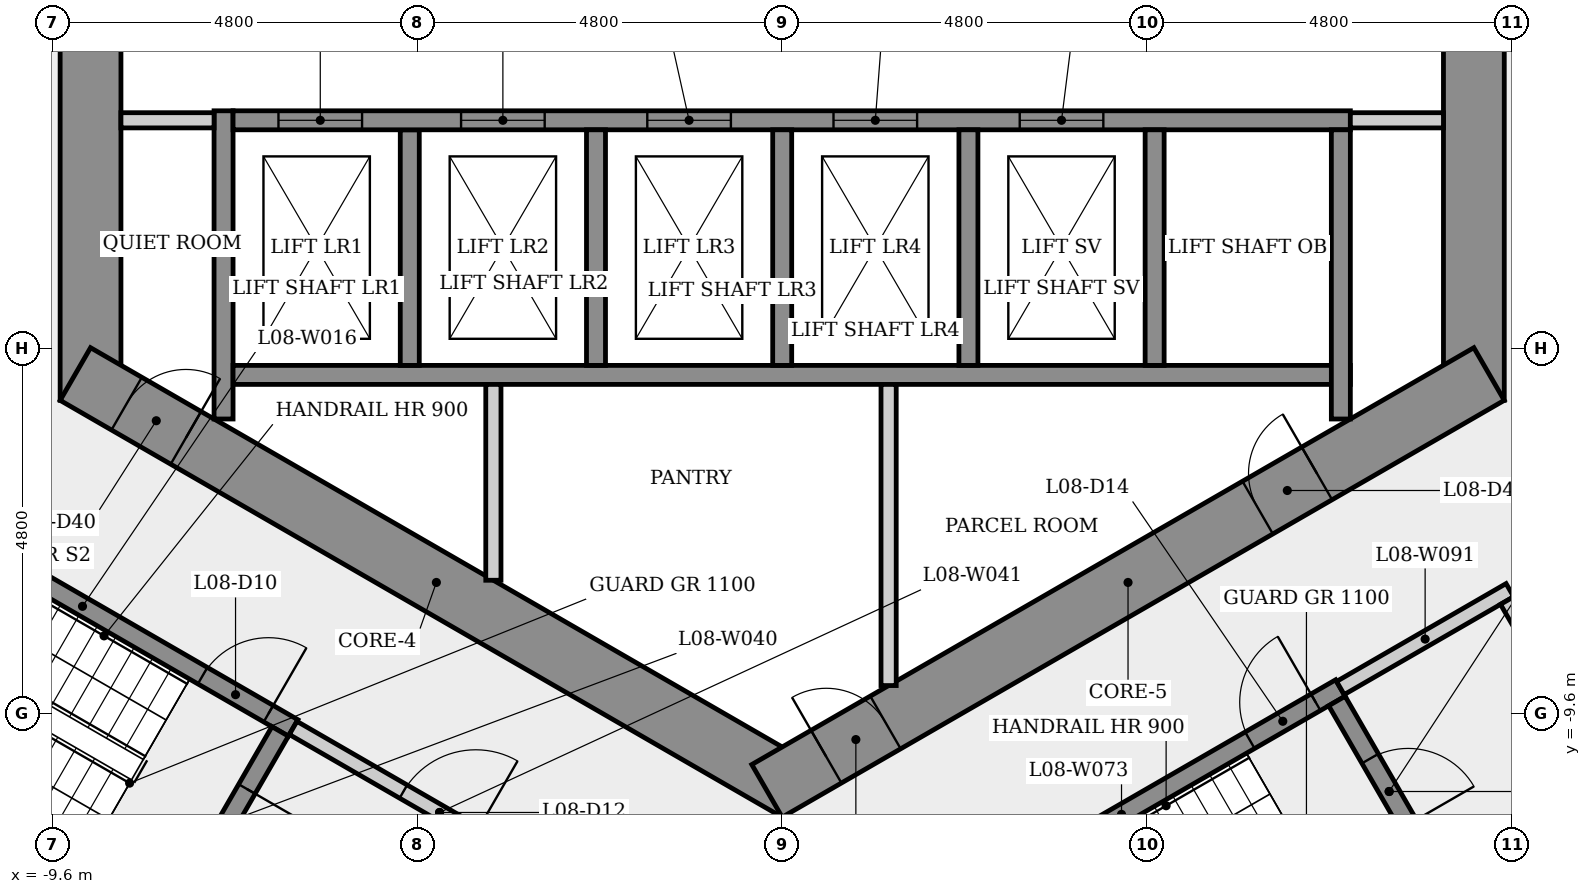
"""IFC4 building model, lengths in metres.
Left out: names, types, materials, properties, quantities, classifications, styles, units other than length and angle.
Written with IfcOpenShell. Run it as: python <this file> out.ifc"""

import sys

from ifc_helpers import new_model, si_unit, direction, frame, frame_2d, origin, place, context, subcontext, project, spatial, rectangle, extrude, element, fill, save


model = new_model("IFC4")
c1 = context("Model", 3, precision=1e-05, world=origin(), true_north=direction((0.0, 1.0)))
c2 = subcontext(c1, "Body", "Model", "MODEL_VIEW")
j1 = project(units=[si_unit("LENGTHUNIT", "METRE"), si_unit("PLANEANGLEUNIT", "RADIAN")], contexts=[c1])
p1 = place(None, origin())
s1 = spatial("IfcSite", under=j1, at=p1, CompositionType="ELEMENT")
p2 = place(p1, origin())
s2 = spatial("IfcBuilding", under=s1, at=p2, CompositionType="ELEMENT")
p3 = place(p2, frame((0.0, 0.0, 35.7)))
s3 = spatial("IfcBuildingStorey", under=s2, at=p3, CompositionType="ELEMENT", Elevation=35.7)
p4 = place(p3, frame((9.1, -5.485, 0.0), z_axis=(0.0, 0.0, 1.0), x_axis=(0.0, 1.0, 0.0)))
e1 = element("IfcWall", 1, at=p4, inside=s3, PredefinedType="SHEAR", context=c2, shape_type="SweptSolid", body=[
    extrude(rectangle(XDim=10.97, YDim=0.8, at=frame_2d((5.485, 0.0))), origin(), (0.0, 0.0, 1.0), 3.4),
])
p5 = place(p4, frame((4.685, 0.0, 0.0)))
e2 = element("IfcOpeningElement", 2, at=p5, cuts=e1, PredefinedType="OPENING", context=c2, shape_type="SweptSolid", body=[
    extrude(rectangle(XDim=1.6, YDim=2.1, at=frame_2d((0.8, 1.05))), frame((0.0, 0.41, 0.0), z_axis=(0.0, -1.0, 0.0), x_axis=(1.0, 0.0, 0.0)), (0.0, 0.0, 1.0), 0.82),
])
p6 = place(p3, frame((-9.1, 5.485, 0.0), z_axis=(0.0, 0.0, 1.0), x_axis=(0.0, -1.0, 0.0)))
e3 = element("IfcWall", 3, at=p6, inside=s3, PredefinedType="SHEAR", context=c2, shape_type="SweptSolid", body=[
    extrude(rectangle(XDim=10.97, YDim=0.8, at=frame_2d((5.485, 0.0))), origin(), (0.0, 0.0, 1.0), 3.4),
])
p7 = place(p6, frame((4.685, 0.0, 0.0)))
e4 = element("IfcOpeningElement", 4, at=p7, cuts=e3, PredefinedType="OPENING", context=c2, shape_type="SweptSolid", body=[
    extrude(rectangle(XDim=1.6, YDim=2.1, at=frame_2d((0.8, 1.05))), frame((0.0, 0.41, 0.0), z_axis=(0.0, -1.0, 0.0), x_axis=(1.0, 0.0, 0.0)), (0.0, 0.0, 1.0), 0.82),
])
p8 = place(p3, frame((-9.3, -5.138, 0.0), z_axis=(0.0, 0.0, 1.0), x_axis=(0.866023993627, -0.500002442456, 0.0)))
e5 = element("IfcWall", 5, at=p8, inside=s3, PredefinedType="SHEAR", context=c2, shape_type="SweptSolid", body=[
    extrude(rectangle(XDim=10.97, YDim=0.8, at=frame_2d((5.485, 0.0))), origin(), (0.0, 0.0, 1.0), 3.4),
])
p9 = place(p8, frame((0.78, 0.0, 0.0)))
e6 = element("IfcOpeningElement", 6, at=p9, cuts=e5, PredefinedType="OPENING", context=c2, shape_type="SweptSolid", body=[
    extrude(rectangle(XDim=0.9, YDim=2.1, at=frame_2d((0.45, 1.05))), frame((0.0, 0.41, 0.0), z_axis=(0.0, -1.0, 0.0), x_axis=(1.0, 0.0, 0.0)), (0.0, 0.0, 1.0), 0.82),
])
p10 = place(p3, frame((-0.2, -10.623, 0.0), z_axis=(0.0, 0.0, 1.0), x_axis=(0.866023993627, 0.500002442456, 0.0)))
e7 = element("IfcWall", 7, at=p10, inside=s3, PredefinedType="SHEAR", context=c2, shape_type="SweptSolid", body=[
    extrude(rectangle(XDim=10.97, YDim=0.8, at=frame_2d((5.485, 0.0))), origin(), (0.0, 0.0, 1.0), 3.4),
])
p11 = place(p10, frame((0.9, 0.0, 0.0)))
e8 = element("IfcOpeningElement", 8, at=p11, cuts=e7, PredefinedType="OPENING", context=c2, shape_type="SweptSolid", body=[
    extrude(rectangle(XDim=0.9, YDim=2.1, at=frame_2d((0.45, 1.05))), frame((0.0, 0.41, 0.0), z_axis=(0.0, -1.0, 0.0), x_axis=(1.0, 0.0, 0.0)), (0.0, 0.0, 1.0), 0.82),
])
p12 = place(p10, frame((7.455, 0.0, 0.0)))
e9 = element("IfcOpeningElement", 9, at=p12, cuts=e7, PredefinedType="OPENING", context=c2, shape_type="SweptSolid", body=[
    extrude(rectangle(XDim=0.9, YDim=2.1, at=frame_2d((0.45, 1.05))), frame((0.0, 0.41, 0.0), z_axis=(0.0, -1.0, 0.0), x_axis=(1.0, 0.0, 0.0)), (0.0, 0.0, 1.0), 0.82),
])
p13 = place(p3, frame((-11.977, -6.595, 0.0), z_axis=(0.0, 0.0, 1.0), x_axis=(0.866025499775, -0.499999833739, 0.0)))
e10 = element("IfcWall", 10, at=p13, inside=s3, PredefinedType="SHEAR", context=c2, shape_type="SweptSolid", body=[
    extrude(rectangle(XDim=6.4, YDim=0.25, at=frame_2d((3.2, 0.0))), origin(), (0.0, 0.0, 1.0), 3.05),
])
p14 = place(p13, frame((5.025, 0.0, 0.0)))
e11 = element("IfcOpeningElement", 11, at=p14, cuts=e10, PredefinedType="OPENING", context=c2, shape_type="SweptSolid", body=[
    extrude(rectangle(XDim=1.0, YDim=2.1, at=frame_2d((0.5, 1.05))), frame((0.0, 0.135, 0.0), z_axis=(0.0, -1.0, 0.0), x_axis=(1.0, 0.0, 0.0)), (0.0, 0.0, 1.0), 0.27),
])
p15 = place(p3, frame((-13.477, -9.193, 0.0), z_axis=(0.0, 0.0, 1.0), x_axis=(0.866025499775, -0.499999833739, 0.0)))
e12 = element("IfcWall", 12, at=p15, inside=s3, PredefinedType="SHEAR", context=c2, shape_type="SweptSolid", body=[
    extrude(rectangle(XDim=6.4, YDim=0.25, at=frame_2d((3.2, 0.0))), origin(), (0.0, 0.0, 1.0), 3.05),
])
p16 = place(p3, frame((-7.35, -5.73, 0.0), z_axis=(0.0, 0.0, 1.0), x_axis=(0.0, 1.0, 0.0)))
e13 = element("IfcWall", 13, at=p16, inside=s3, PredefinedType="SHEAR", context=c2, shape_type="SweptSolid", body=[
    extrude(rectangle(XDim=4.055, YDim=0.25, at=frame_2d((2.028, 0.0))), origin(), (0.0, 0.0, 1.0), 3.05),
])
p17 = place(p3, frame((-7.475, -1.8, 0.0), z_axis=(0.0, 0.0, 1.0), x_axis=(-1.0, 0.0, 0.0)))
e14 = element("IfcWall", 14, at=p17, inside=s3, PredefinedType="PARTITIONING", context=c2, shape_type="SweptSolid", body=[
    extrude(rectangle(XDim=1.225, YDim=0.2, at=frame_2d((0.613, 0.0))), origin(), (0.0, 0.0, 1.0), 3.05),
])
p18 = place(p3, frame((-6.605, -9.841, 0.0), z_axis=(0.0, 0.0, 1.0), x_axis=(-0.499996545922, -0.866027397988, 0.0)))
e15 = element("IfcWall", 15, at=p18, inside=s3, PredefinedType="SHEAR", context=c2, shape_type="SweptSolid", body=[
    extrude(rectangle(XDim=2.75, YDim=0.25, at=frame_2d((1.375, 0.0))), origin(), (0.0, 0.0, 1.0), 3.05),
])
p19 = place(p18, frame((0.875, 0.0, 0.0)))
e16 = element("IfcOpeningElement", 16, at=p19, cuts=e15, PredefinedType="OPENING", context=c2, shape_type="SweptSolid", body=[
    extrude(rectangle(XDim=1.0, YDim=2.1, at=frame_2d((0.5, 1.05))), frame((0.0, 0.135, 0.0), z_axis=(0.0, -1.0, 0.0), x_axis=(1.0, 0.0, 0.0)), (0.0, 0.0, 1.0), 0.27),
])
p20 = place(p3, frame((-6.435, -9.795, 0.0), z_axis=(0.0, 0.0, 1.0), x_axis=(0.866012907634, -0.500021643343, 0.0)))
e17 = element("IfcWall", 17, at=p20, inside=s3, PredefinedType="PARTITIONING", context=c2, shape_type="SweptSolid", body=[
    extrude(rectangle(XDim=4.45, YDim=0.2, at=frame_2d((2.225, 0.0))), origin(), (0.0, 0.0, 1.0), 3.05),
])
p21 = place(p20, frame((1.675, 0.0, 0.0)))
e18 = element("IfcOpeningElement", 18, at=p21, cuts=e17, PredefinedType="OPENING", context=c2, shape_type="SweptSolid", body=[
    extrude(rectangle(XDim=1.1, YDim=2.1, at=frame_2d((0.55, 1.05))), frame((0.0, 0.11, 0.0), z_axis=(0.0, -1.0, 0.0), x_axis=(1.0, 0.0, 0.0)), (0.0, 0.0, 1.0), 0.22),
])
p22 = place(p3, frame((-7.225, -5.15, 0.0), z_axis=(0.0, 0.0, 1.0), x_axis=(1.0, 0.0, 0.0)))
e19 = element("IfcWall", 19, at=p22, inside=s3, PredefinedType="SHEAR", context=c2, shape_type="SweptSolid", body=[
    extrude(rectangle(XDim=14.7, YDim=0.25, at=frame_2d((7.35, 0.0))), origin(), (0.0, 0.0, 1.0), 3.05),
])
p23 = place(p3, frame((-4.9, -1.925, 0.0), z_axis=(0.0, 0.0, 1.0), x_axis=(0.0, -1.0, 0.0)))
e20 = element("IfcWall", 20, at=p23, inside=s3, PredefinedType="SHEAR", context=c2, shape_type="SweptSolid", body=[
    extrude(rectangle(XDim=3.1, YDim=0.25, at=frame_2d((1.55, 0.0))), origin(), (0.0, 0.0, 1.0), 3.4),
])
p24 = place(p3, frame((-7.225, -1.8, 0.0), z_axis=(0.0, 0.0, 1.0), x_axis=(1.0, 0.0, 0.0)))
e21 = element("IfcWall", 21, at=p24, inside=s3, PredefinedType="SHEAR", context=c2, shape_type="SweptSolid", body=[
    extrude(rectangle(XDim=14.7, YDim=0.25, at=frame_2d((7.35, 0.0))), origin(), (0.0, 0.0, 1.0), 3.05),
])
p25 = place(p24, frame((0.597, 0.0, 0.0)))
e22 = element("IfcOpeningElement", 22, at=p25, cuts=e21, PredefinedType="OPENING", context=c2, shape_type="SweptSolid", body=[
    extrude(rectangle(XDim=1.1, YDim=2.1, at=frame_2d((0.55, 1.05))), frame((0.0, 0.135, 0.0), z_axis=(0.0, -1.0, 0.0), x_axis=(1.0, 0.0, 0.0)), (0.0, 0.0, 1.0), 0.27),
])
p26 = place(p24, frame((3.0, 0.0, 0.0)))
e23 = element("IfcOpeningElement", 23, at=p26, cuts=e21, PredefinedType="OPENING", context=c2, shape_type="SweptSolid", body=[
    extrude(rectangle(XDim=1.1, YDim=2.1, at=frame_2d((0.55, 1.05))), frame((0.0, 0.135, 0.0), z_axis=(0.0, -1.0, 0.0), x_axis=(1.0, 0.0, 0.0)), (0.0, 0.0, 1.0), 0.27),
])
p27 = place(p24, frame((5.45, 0.0, 0.0)))
e24 = element("IfcOpeningElement", 24, at=p27, cuts=e21, PredefinedType="OPENING", context=c2, shape_type="SweptSolid", body=[
    extrude(rectangle(XDim=1.1, YDim=2.1, at=frame_2d((0.55, 1.05))), frame((0.0, 0.135, 0.0), z_axis=(0.0, -1.0, 0.0), x_axis=(1.0, 0.0, 0.0)), (0.0, 0.0, 1.0), 0.27),
])
p28 = place(p24, frame((7.9, 0.0, 0.0)))
e25 = element("IfcOpeningElement", 25, at=p28, cuts=e21, PredefinedType="OPENING", context=c2, shape_type="SweptSolid", body=[
    extrude(rectangle(XDim=1.1, YDim=2.1, at=frame_2d((0.55, 1.05))), frame((0.0, 0.135, 0.0), z_axis=(0.0, -1.0, 0.0), x_axis=(1.0, 0.0, 0.0)), (0.0, 0.0, 1.0), 0.27),
])
p29 = place(p24, frame((10.35, 0.0, 0.0)))
e26 = element("IfcOpeningElement", 26, at=p29, cuts=e21, PredefinedType="OPENING", context=c2, shape_type="SweptSolid", body=[
    extrude(rectangle(XDim=1.1, YDim=2.1, at=frame_2d((0.55, 1.05))), frame((0.0, 0.135, 0.0), z_axis=(0.0, -1.0, 0.0), x_axis=(1.0, 0.0, 0.0)), (0.0, 0.0, 1.0), 0.27),
])
p30 = place(p3, frame((-3.8, -5.275, 0.0), z_axis=(0.0, 0.0, 1.0), x_axis=(0.0, -1.0, 0.0)))
e27 = element("IfcWall", 27, at=p30, inside=s3, PredefinedType="PARTITIONING", context=c2, shape_type="SweptSolid", body=[
    extrude(rectangle(XDim=2.577, YDim=0.2, at=frame_2d((1.289, 0.0))), origin(), (0.0, 0.0, 1.0), 3.05),
])
for number, where, z_axis, x_axis in (
    (28, (-2.45, -1.925, 0.0), (0.0, 0.0, 1.0), (0.0, -1.0, 0.0)),
    (29, (0.0, -1.925, 0.0), (0.0, 0.0, 1.0), (0.0, -1.0, 0.0)),
):
    element("IfcWall", number, at=place(p3, frame(where, z_axis=z_axis, x_axis=x_axis)), inside=s3, PredefinedType="SHEAR", context=c2, shape_type="SweptSolid", body=[
        extrude(rectangle(XDim=3.1, YDim=0.25, at=frame_2d((1.55, 0.0))), origin(), (0.0, 0.0, 1.0), 3.4),
    ])
p31 = place(p3, frame((1.4, -5.275, 0.0), z_axis=(0.0, 0.0, 1.0), x_axis=(0.0, -1.0, 0.0)))
e30 = element("IfcWall", 30, at=p31, inside=s3, PredefinedType="PARTITIONING", context=c2, shape_type="SweptSolid", body=[
    extrude(rectangle(XDim=3.963, YDim=0.2, at=frame_2d((1.981, 0.0))), origin(), (0.0, 0.0, 1.0), 3.05),
])
p32 = place(p3, frame((1.585, -12.595, 0.0), z_axis=(0.0, 0.0, 1.0), x_axis=(0.866036417653, 0.499980922934, 0.0)))
e31 = element("IfcWall", 31, at=p32, inside=s3, PredefinedType="SHEAR", context=c2, shape_type="SweptSolid", body=[
    extrude(rectangle(XDim=6.65, YDim=0.25, at=frame_2d((3.325, 0.0))), origin(), (0.0, 0.0, 1.0), 3.05),
])
p33 = place(p32, frame((5.275, 0.0, 0.0)))
e32 = element("IfcOpeningElement", 32, at=p33, cuts=e31, PredefinedType="OPENING", context=c2, shape_type="SweptSolid", body=[
    extrude(rectangle(XDim=1.0, YDim=2.1, at=frame_2d((0.5, 1.05))), frame((0.0, 0.135, 0.0), z_axis=(0.0, -1.0, 0.0), x_axis=(1.0, 0.0, 0.0)), (0.0, 0.0, 1.0), 0.27),
])
for number, where, z_axis, x_axis in (
    (33, (2.45, -1.925, 0.0), (0.0, 0.0, 1.0), (0.0, -1.0, 0.0)),
    (34, (4.9, -1.925, 0.0), (0.0, 0.0, 1.0), (0.0, -1.0, 0.0)),
):
    element("IfcWall", number, at=place(p3, frame(where, z_axis=z_axis, x_axis=x_axis)), inside=s3, PredefinedType="SHEAR", context=c2, shape_type="SweptSolid", body=[
        extrude(rectangle(XDim=3.1, YDim=0.25, at=frame_2d((1.55, 0.0))), origin(), (0.0, 0.0, 1.0), 3.4),
    ])
p34 = place(p3, frame((7.298, -9.441, 0.0), z_axis=(0.0, 0.0, 1.0), x_axis=(0.500034990121, -0.866005201286, 0.0)))
e35 = element("IfcWall", 35, at=p34, inside=s3, PredefinedType="SHEAR", context=c2, shape_type="SweptSolid", body=[
    extrude(rectangle(XDim=2.75, YDim=0.25, at=frame_2d((1.375, 0.0))), origin(), (0.0, 0.0, 1.0), 3.05),
])
p35 = place(p34, frame((0.875, 0.0, 0.0)))
e36 = element("IfcOpeningElement", 36, at=p35, cuts=e35, PredefinedType="OPENING", context=c2, shape_type="SweptSolid", body=[
    extrude(rectangle(XDim=1.0, YDim=2.1, at=frame_2d((0.5, 1.05))), frame((0.0, 0.135, 0.0), z_axis=(0.0, -1.0, 0.0), x_axis=(1.0, 0.0, 0.0)), (0.0, 0.0, 1.0), 0.27),
])
p36 = place(p3, frame((7.344, -9.27, 0.0), z_axis=(0.0, 0.0, 1.0), x_axis=(0.866005588531, 0.500034319456, 0.0)))
e37 = element("IfcWall", 37, at=p36, inside=s3, PredefinedType="PARTITIONING", context=c2, shape_type="SweptSolid", body=[
    extrude(rectangle(XDim=2.575, YDim=0.2, at=frame_2d((1.288, 0.0))), origin(), (0.0, 0.0, 1.0), 3.05),
])
p37 = place(p3, frame((7.35, -1.925, 0.0), z_axis=(0.0, 0.0, 1.0), x_axis=(0.0, -1.0, 0.0)))
e38 = element("IfcWall", 38, at=p37, inside=s3, PredefinedType="SHEAR", context=c2, shape_type="SweptSolid", body=[
    extrude(rectangle(XDim=3.805, YDim=0.25, at=frame_2d((1.903, 0.0))), origin(), (0.0, 0.0, 1.0), 3.05),
])
p38 = place(p3, frame((8.7, -1.8, 0.0), z_axis=(0.0, 0.0, 1.0), x_axis=(-1.0, 0.0, 0.0)))
e39 = element("IfcWall", 39, at=p38, inside=s3, PredefinedType="PARTITIONING", context=c2, shape_type="SweptSolid", body=[
    extrude(rectangle(XDim=1.225, YDim=0.2, at=frame_2d((0.613, 0.0))), origin(), (0.0, 0.0, 1.0), 3.05),
])
p39 = place(p3, frame((9.537, -8.119, 0.0), z_axis=(0.0, 0.0, 1.0), x_axis=(0.499990139034, -0.866031096941, 0.0)))
e40 = element("IfcWall", 40, at=p39, inside=s3, PredefinedType="PARTITIONING", context=c2, shape_type="SweptSolid", body=[
    extrude(rectangle(XDim=3.0, YDim=0.2, at=frame_2d((1.5, 0.0))), origin(), (0.0, 0.0, 1.0), 3.05),
])
p40 = place(p39, frame((0.935, 0.0, 0.0)))
e41 = element("IfcOpeningElement", 41, at=p40, cuts=e40, PredefinedType="OPENING", context=c2, shape_type="SweptSolid", body=[
    extrude(rectangle(XDim=1.0, YDim=2.1, at=frame_2d((0.5, 1.05))), frame((0.0, 0.11, 0.0), z_axis=(0.0, -1.0, 0.0), x_axis=(1.0, 0.0, 0.0)), (0.0, 0.0, 1.0), 0.22),
])
p41 = place(p3, frame((10.901, -10.681, 0.0), z_axis=(0.0, 0.0, 1.0), x_axis=(-0.866009402589, -0.500027713859, 0.0)))
e42 = element("IfcWall", 42, at=p41, inside=s3, PredefinedType="PARTITIONING", context=c2, shape_type="SweptSolid", body=[
    extrude(rectangle(XDim=2.1, YDim=0.2, at=frame_2d((1.05, 0.0))), origin(), (0.0, 0.0, 1.0), 3.05),
])
p42 = place(p25, origin())
e43 = element("IfcDoor", 43, at=p42, inside=s3, OperationType="SLIDING_TO_LEFT", PredefinedType="DOOR", context=c2, shape_type="SweptSolid", body=[
    extrude(rectangle(XDim=1.1, YDim=2.1, at=frame_2d((0.55, 1.05))), frame((0.0, 0.025, 0.0), z_axis=(0.0, -1.0, 0.0), x_axis=(1.0, 0.0, 0.0)), (0.0, 0.0, 1.0), 0.05),
])
fill(e22, e43)
p43 = place(p26, origin())
e44 = element("IfcDoor", 44, at=p43, inside=s3, OperationType="SLIDING_TO_LEFT", PredefinedType="DOOR", context=c2, shape_type="SweptSolid", body=[
    extrude(rectangle(XDim=1.1, YDim=2.1, at=frame_2d((0.55, 1.05))), frame((0.0, 0.025, 0.0), z_axis=(0.0, -1.0, 0.0), x_axis=(1.0, 0.0, 0.0)), (0.0, 0.0, 1.0), 0.05),
])
fill(e23, e44)
p44 = place(p27, origin())
e45 = element("IfcDoor", 45, at=p44, inside=s3, OperationType="SLIDING_TO_LEFT", PredefinedType="DOOR", context=c2, shape_type="SweptSolid", body=[
    extrude(rectangle(XDim=1.1, YDim=2.1, at=frame_2d((0.55, 1.05))), frame((0.0, 0.025, 0.0), z_axis=(0.0, -1.0, 0.0), x_axis=(1.0, 0.0, 0.0)), (0.0, 0.0, 1.0), 0.05),
])
fill(e24, e45)
p45 = place(p28, origin())
e46 = element("IfcDoor", 46, at=p45, inside=s3, OperationType="SLIDING_TO_LEFT", PredefinedType="DOOR", context=c2, shape_type="SweptSolid", body=[
    extrude(rectangle(XDim=1.1, YDim=2.1, at=frame_2d((0.55, 1.05))), frame((0.0, 0.025, 0.0), z_axis=(0.0, -1.0, 0.0), x_axis=(1.0, 0.0, 0.0)), (0.0, 0.0, 1.0), 0.05),
])
fill(e25, e46)
p46 = place(p29, origin())
e47 = element("IfcDoor", 47, at=p46, inside=s3, OperationType="SLIDING_TO_LEFT", PredefinedType="DOOR", context=c2, shape_type="SweptSolid", body=[
    extrude(rectangle(XDim=1.1, YDim=2.1, at=frame_2d((0.55, 1.05))), frame((0.0, 0.025, 0.0), z_axis=(0.0, -1.0, 0.0), x_axis=(1.0, 0.0, 0.0)), (0.0, 0.0, 1.0), 0.05),
])
fill(e26, e47)
p47 = place(p14, origin())
e48 = element("IfcDoor", 48, at=p47, inside=s3, OperationType="SINGLE_SWING_RIGHT", PredefinedType="DOOR", context=c2, shape_type="SweptSolid", body=[
    extrude(rectangle(XDim=1.0, YDim=2.1, at=frame_2d((0.5, 1.05))), frame((0.0, 0.025, 0.0), z_axis=(0.0, -1.0, 0.0), x_axis=(1.0, 0.0, 0.0)), (0.0, 0.0, 1.0), 0.05),
])
fill(e11, e48)
p48 = place(p19, origin())
e49 = element("IfcDoor", 49, at=p48, inside=s3, OperationType="SINGLE_SWING_LEFT", PredefinedType="DOOR", context=c2, shape_type="SweptSolid", body=[
    extrude(rectangle(XDim=1.0, YDim=2.1, at=frame_2d((0.5, 1.05))), frame((0.0, 0.025, 0.0), z_axis=(0.0, -1.0, 0.0), x_axis=(1.0, 0.0, 0.0)), (0.0, 0.0, 1.0), 0.05),
])
fill(e16, e49)
p49 = place(p21, origin())
e50 = element("IfcDoor", 50, at=p49, inside=s3, OperationType="SINGLE_SWING_RIGHT", PredefinedType="DOOR", context=c2, shape_type="SweptSolid", body=[
    extrude(rectangle(XDim=1.1, YDim=2.1, at=frame_2d((0.55, 1.05))), frame((0.0, 0.025, 0.0), z_axis=(0.0, -1.0, 0.0), x_axis=(1.0, 0.0, 0.0)), (0.0, 0.0, 1.0), 0.05),
])
fill(e18, e50)
p50 = place(p33, origin())
e51 = element("IfcDoor", 51, at=p50, inside=s3, OperationType="SINGLE_SWING_RIGHT", PredefinedType="DOOR", context=c2, shape_type="SweptSolid", body=[
    extrude(rectangle(XDim=1.0, YDim=2.1, at=frame_2d((0.5, 1.05))), frame((0.0, 0.025, 0.0), z_axis=(0.0, -1.0, 0.0), x_axis=(1.0, 0.0, 0.0)), (0.0, 0.0, 1.0), 0.05),
])
fill(e32, e51)
p51 = place(p35, origin())
e52 = element("IfcDoor", 52, at=p51, inside=s3, OperationType="SINGLE_SWING_RIGHT", PredefinedType="DOOR", context=c2, shape_type="SweptSolid", body=[
    extrude(rectangle(XDim=1.0, YDim=2.1, at=frame_2d((0.5, 1.05))), frame((0.0, 0.025, 0.0), z_axis=(0.0, -1.0, 0.0), x_axis=(1.0, 0.0, 0.0)), (0.0, 0.0, 1.0), 0.05),
])
fill(e36, e52)
p52 = place(p9, origin())
e53 = element("IfcDoor", 53, at=p52, inside=s3, OperationType="SINGLE_SWING_RIGHT", PredefinedType="DOOR", context=c2, shape_type="SweptSolid", body=[
    extrude(rectangle(XDim=0.9, YDim=2.1, at=frame_2d((0.45, 1.05))), frame((0.0, 0.025, 0.0), z_axis=(0.0, -1.0, 0.0), x_axis=(1.0, 0.0, 0.0)), (0.0, 0.0, 1.0), 0.05),
])
fill(e6, e53)
p53 = place(p11, origin())
e54 = element("IfcDoor", 54, at=p53, inside=s3, OperationType="SINGLE_SWING_LEFT", PredefinedType="DOOR", context=c2, shape_type="SweptSolid", body=[
    extrude(rectangle(XDim=0.9, YDim=2.1, at=frame_2d((0.45, 1.05))), frame((0.0, 0.025, 0.0), z_axis=(0.0, -1.0, 0.0), x_axis=(1.0, 0.0, 0.0)), (0.0, 0.0, 1.0), 0.05),
])
fill(e8, e54)
p54 = place(p12, origin())
e55 = element("IfcDoor", 55, at=p54, inside=s3, OperationType="SINGLE_SWING_RIGHT", PredefinedType="DOOR", context=c2, shape_type="SweptSolid", body=[
    extrude(rectangle(XDim=0.9, YDim=2.1, at=frame_2d((0.45, 1.05))), frame((0.0, 0.025, 0.0), z_axis=(0.0, -1.0, 0.0), x_axis=(1.0, 0.0, 0.0)), (0.0, 0.0, 1.0), 0.05),
])
fill(e9, e55)
save(model, sys.argv[1])
